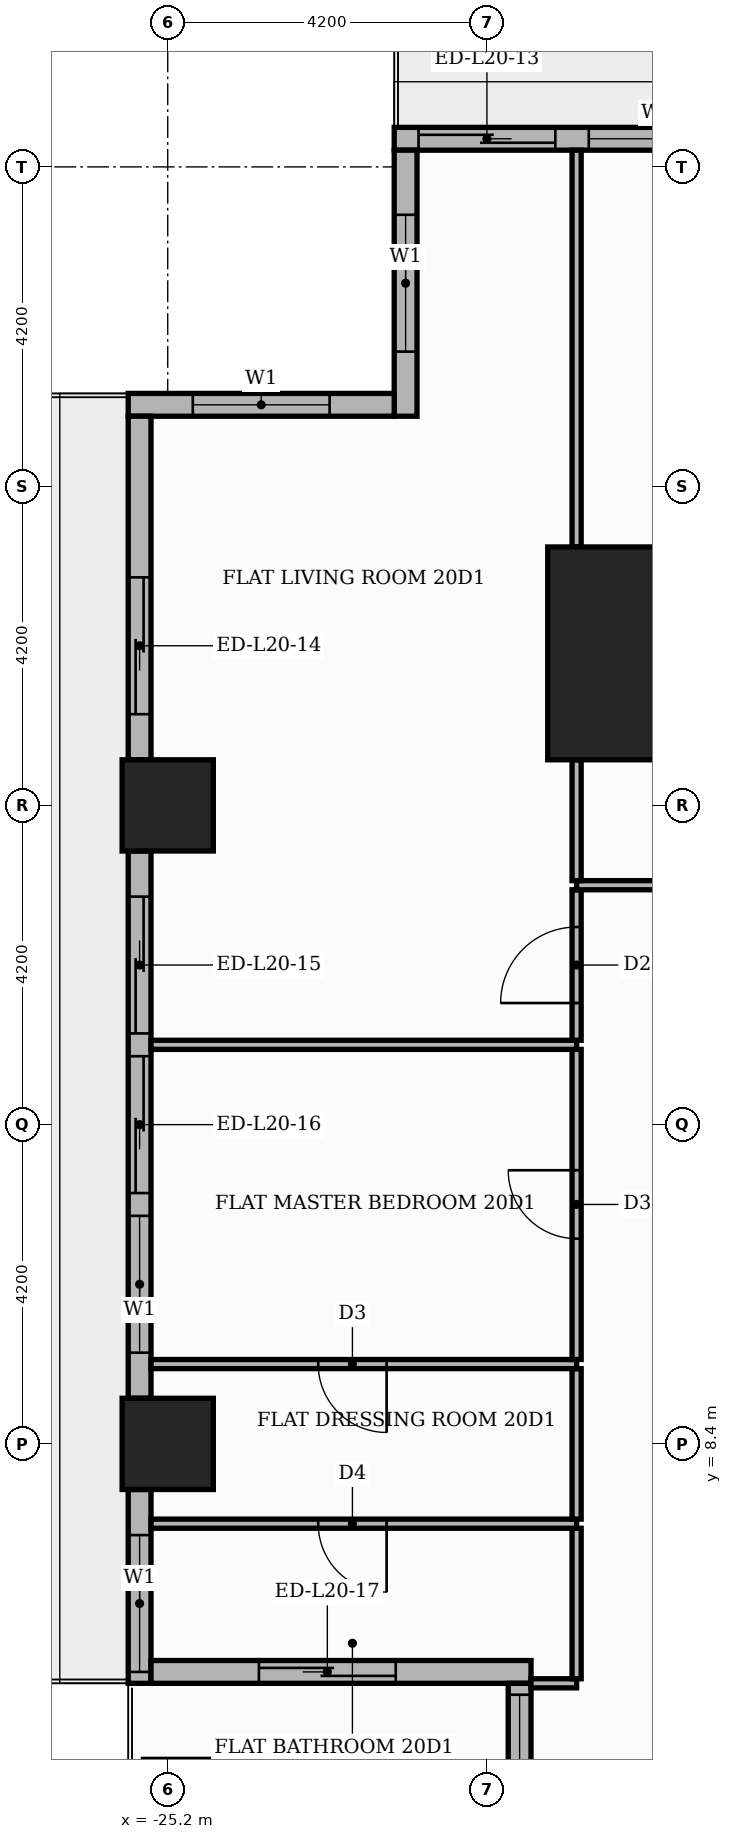
"""IFC4 building model, lengths in metres.
Left out: names, types, materials, properties, quantities, classifications, styles, units other than length and angle.
Written with IfcOpenShell. Run it as: python <this file> out.ifc"""

import sys

from ifc_helpers import new_model, si_unit, direction, frame, frame_2d, origin, origin_2d, place, context, subcontext, project, spatial, rectangle, extrude, element, fill, save


model = new_model("IFC4")
c1 = context("Model", 3, precision=1e-05, world=origin(), true_north=direction((0.0, 1.0)))
c2 = subcontext(c1, "Body", "Model", "MODEL_VIEW")
j1 = project(units=[si_unit("LENGTHUNIT", "METRE"), si_unit("PLANEANGLEUNIT", "RADIAN")], contexts=[c1])
p1 = place(None, origin())
s1 = spatial("IfcSite", under=j1, at=p1, CompositionType="ELEMENT")
p2 = place(p1, origin())
s2 = spatial("IfcBuilding", under=s1, at=p2, CompositionType="ELEMENT")
p3 = place(p2, frame((0.0, 0.0, 87.0)))
s3 = spatial("IfcBuildingStorey", under=s2, at=p3, CompositionType="ELEMENT", Elevation=87.0)
p4 = place(p3, frame((-18.8, 18.8, 0.0), z_axis=(0.0, 0.0, 1.0), x_axis=(1.0, 0.0, 0.0)))
e1 = element("IfcColumn", 1, at=p4, inside=s3, PredefinedType="COLUMN", context=c2, shape_type="SweptSolid", body=[
    extrude(rectangle(XDim=2.8, YDim=2.8, at=origin_2d()), origin(), (0.0, 0.0, 1.0), 3.9),
])
for number, where, z_axis, x_axis in (
    (2, (-25.2, 8.4, 0.0), (0.0, 0.0, 1.0), (1.0, 0.0, 0.0)),
    (3, (-25.2, 16.8, 0.0), (0.0, 0.0, 1.0), (1.0, 0.0, 0.0)),
):
    element("IfcColumn", number, at=place(p3, frame(where, z_axis=z_axis, x_axis=x_axis)), inside=s3, PredefinedType="COLUMN", context=c2, shape_type="SweptSolid", body=[
        extrude(rectangle(XDim=1.2, YDim=1.2, at=origin_2d()), origin(), (0.0, 0.0, 1.0), 3.9),
    ])
p5 = place(p3, frame((-17.4, 25.57, 0.0), z_axis=(0.0, 0.0, 1.0), x_axis=(-1.0, 0.0, 0.0)))
e4 = element("IfcWall", 4, at=p5, inside=s3, PredefinedType="STANDARD", context=c2, shape_type="SweptSolid", body=[
    extrude(rectangle(XDim=4.82, YDim=0.3, at=frame_2d((2.41, 0.0))), origin(), (0.0, 0.0, 1.0), 3.48),
])
p6 = place(p5, frame((2.7, 0.0, 0.0)))
e5 = element("IfcOpeningElement", 5, at=p6, cuts=e4, PredefinedType="OPENING", context=c2, shape_type="SweptSolid", body=[
    extrude(rectangle(XDim=1.8, YDim=2.4, at=frame_2d((0.9, 1.2))), frame((0.0, 0.16, 0.0), z_axis=(0.0, -1.0, 0.0), x_axis=(1.0, 0.0, 0.0)), (0.0, 0.0, 1.0), 0.32),
])
p7 = place(p5, frame((0.46, 0.0, 0.9)))
e6 = element("IfcOpeningElement", 6, at=p7, cuts=e4, PredefinedType="OPENING", context=c2, shape_type="SweptSolid", body=[
    extrude(rectangle(XDim=1.8, YDim=2.1, at=frame_2d((0.9, 1.05))), frame((0.0, 0.16, 0.0), z_axis=(0.0, -1.0, 0.0), x_axis=(1.0, 0.0, 0.0)), (0.0, 0.0, 1.0), 0.32),
])
p8 = place(p3, frame((-22.07, 25.42, 0.0), z_axis=(0.0, 0.0, 1.0), x_axis=(0.0, -1.0, 0.0)))
e7 = element("IfcWall", 7, at=p8, inside=s3, PredefinedType="STANDARD", context=c2, shape_type="SweptSolid", body=[
    extrude(rectangle(XDim=3.5, YDim=0.3, at=frame_2d((1.75, 0.0))), origin(), (0.0, 0.0, 1.0), 3.48),
])
p9 = place(p8, frame((0.85, 0.0, 0.9)))
e8 = element("IfcOpeningElement", 8, at=p9, cuts=e7, PredefinedType="OPENING", context=c2, shape_type="SweptSolid", body=[
    extrude(rectangle(XDim=1.8, YDim=2.1, at=frame_2d((0.9, 1.05))), frame((0.0, 0.16, 0.0), z_axis=(0.0, -1.0, 0.0), x_axis=(1.0, 0.0, 0.0)), (0.0, 0.0, 1.0), 0.32),
])
p10 = place(p3, frame((-22.22, 22.07, 0.0), z_axis=(0.0, 0.0, 1.0), x_axis=(-1.0, 0.0, 0.0)))
e9 = element("IfcWall", 9, at=p10, inside=s3, PredefinedType="STANDARD", context=c2, shape_type="SweptSolid", body=[
    extrude(rectangle(XDim=3.5, YDim=0.3, at=frame_2d((1.75, 0.0))), origin(), (0.0, 0.0, 1.0), 3.48),
])
p11 = place(p10, frame((0.85, 0.0, 0.9)))
e10 = element("IfcOpeningElement", 10, at=p11, cuts=e9, PredefinedType="OPENING", context=c2, shape_type="SweptSolid", body=[
    extrude(rectangle(XDim=1.8, YDim=2.1, at=frame_2d((0.9, 1.05))), frame((0.0, 0.16, 0.0), z_axis=(0.0, -1.0, 0.0), x_axis=(1.0, 0.0, 0.0)), (0.0, 0.0, 1.0), 0.32),
])
p12 = place(p3, frame((-25.57, 21.92, 0.0), z_axis=(0.0, 0.0, 1.0), x_axis=(0.0, -1.0, 0.0)))
e11 = element("IfcWall", 11, at=p12, inside=s3, PredefinedType="STANDARD", context=c2, shape_type="SweptSolid", body=[
    extrude(rectangle(XDim=4.52, YDim=0.3, at=frame_2d((2.26, 0.0))), origin(), (0.0, 0.0, 1.0), 3.48),
])
p13 = place(p12, frame((2.12, 0.0, 0.0)))
e12 = element("IfcOpeningElement", 12, at=p13, cuts=e11, PredefinedType="OPENING", context=c2, shape_type="SweptSolid", body=[
    extrude(rectangle(XDim=1.8, YDim=2.4, at=frame_2d((0.9, 1.2))), frame((0.0, 0.16, 0.0), z_axis=(0.0, -1.0, 0.0), x_axis=(1.0, 0.0, 0.0)), (0.0, 0.0, 1.0), 0.32),
])
p14 = place(p3, frame((-25.57, 16.2, 0.0), z_axis=(0.0, 0.0, 1.0), x_axis=(0.0, -1.0, 0.0)))
e13 = element("IfcWall", 13, at=p14, inside=s3, PredefinedType="STANDARD", context=c2, shape_type="SweptSolid", body=[
    extrude(rectangle(XDim=7.2, YDim=0.3, at=frame_2d((3.6, 0.0))), origin(), (0.0, 0.0, 1.0), 3.48),
])
p15 = place(p14, frame((0.6, 0.0, 0.0)))
e14 = element("IfcOpeningElement", 14, at=p15, cuts=e13, PredefinedType="OPENING", context=c2, shape_type="SweptSolid", body=[
    extrude(rectangle(XDim=1.8, YDim=2.4, at=frame_2d((0.9, 1.2))), frame((0.0, 0.16, 0.0), z_axis=(0.0, -1.0, 0.0), x_axis=(1.0, 0.0, 0.0)), (0.0, 0.0, 1.0), 0.32),
])
p16 = place(p14, frame((2.7, 0.0, 0.0)))
e15 = element("IfcOpeningElement", 15, at=p16, cuts=e13, PredefinedType="OPENING", context=c2, shape_type="SweptSolid", body=[
    extrude(rectangle(XDim=1.8, YDim=2.4, at=frame_2d((0.9, 1.2))), frame((0.0, 0.16, 0.0), z_axis=(0.0, -1.0, 0.0), x_axis=(1.0, 0.0, 0.0)), (0.0, 0.0, 1.0), 0.32),
])
p17 = place(p14, frame((4.8, 0.0, 0.9)))
e16 = element("IfcOpeningElement", 16, at=p17, cuts=e13, PredefinedType="OPENING", context=c2, shape_type="SweptSolid", body=[
    extrude(rectangle(XDim=1.8, YDim=2.1, at=frame_2d((0.9, 1.05))), frame((0.0, 0.16, 0.0), z_axis=(0.0, -1.0, 0.0), x_axis=(1.0, 0.0, 0.0)), (0.0, 0.0, 1.0), 0.32),
])
p18 = place(p3, frame((-25.57, 7.8, 0.0), z_axis=(0.0, 0.0, 1.0), x_axis=(0.0, -1.0, 0.0)))
e17 = element("IfcWall", 17, at=p18, inside=s3, PredefinedType="STANDARD", context=c2, shape_type="SweptSolid", body=[
    extrude(rectangle(XDim=2.55, YDim=0.3, at=frame_2d((1.275, 0.0))), origin(), (0.0, 0.0, 1.0), 3.48),
])
p19 = place(p18, frame((0.6, 0.0, 0.9)))
e18 = element("IfcOpeningElement", 18, at=p19, cuts=e17, PredefinedType="OPENING", context=c2, shape_type="SweptSolid", body=[
    extrude(rectangle(XDim=1.8, YDim=2.1, at=frame_2d((0.9, 1.05))), frame((0.0, 0.16, 0.0), z_axis=(0.0, -1.0, 0.0), x_axis=(1.0, 0.0, 0.0)), (0.0, 0.0, 1.0), 0.32),
])
p20 = place(p3, frame((-25.42, 5.4, 0.0), z_axis=(0.0, 0.0, 1.0), x_axis=(1.0, 0.0, 0.0)))
e19 = element("IfcWall", 19, at=p20, inside=s3, PredefinedType="STANDARD", context=c2, shape_type="SweptSolid", body=[
    extrude(rectangle(XDim=5.0, YDim=0.3, at=frame_2d((2.5, 0.0))), origin(), (0.0, 0.0, 1.0), 3.48),
])
p21 = place(p20, frame((1.42, 0.0, 0.0)))
e20 = element("IfcOpeningElement", 20, at=p21, cuts=e19, PredefinedType="OPENING", context=c2, shape_type="SweptSolid", body=[
    extrude(rectangle(XDim=1.8, YDim=2.4, at=frame_2d((0.9, 1.2))), frame((0.0, 0.16, 0.0), z_axis=(0.0, -1.0, 0.0), x_axis=(1.0, 0.0, 0.0)), (0.0, 0.0, 1.0), 0.32),
])
p22 = place(p3, frame((-20.57, 5.25, 0.0), z_axis=(0.0, 0.0, 1.0), x_axis=(0.0, -1.0, 0.0)))
e21 = element("IfcWall", 21, at=p22, inside=s3, PredefinedType="STANDARD", context=c2, shape_type="SweptSolid", body=[
    extrude(rectangle(XDim=10.8, YDim=0.3, at=frame_2d((5.4, 0.0))), origin(), (0.0, 0.0, 1.0), 3.48),
])
p23 = place(p22, frame((0.15, 0.0, 0.9)))
e22 = element("IfcOpeningElement", 22, at=p23, cuts=e21, PredefinedType="OPENING", context=c2, shape_type="SweptSolid", body=[
    extrude(rectangle(XDim=6.0, YDim=2.1, at=frame_2d((3.0, 1.05))), frame((0.0, 0.16, 0.0), z_axis=(0.0, -1.0, 0.0), x_axis=(1.0, 0.0, 0.0)), (0.0, 0.0, 1.0), 0.32),
])
p24 = place(p22, frame((6.45, 0.0, 0.9)))
e23 = element("IfcOpeningElement", 23, at=p24, cuts=e21, PredefinedType="OPENING", context=c2, shape_type="SweptSolid", body=[
    extrude(rectangle(XDim=3.9, YDim=2.1, at=frame_2d((1.95, 1.05))), frame((0.0, 0.16, 0.0), z_axis=(0.0, -1.0, 0.0), x_axis=(1.0, 0.0, 0.0)), (0.0, 0.0, 1.0), 0.32),
])
p25 = place(p3, frame((-20.42, 5.25, 0.0), z_axis=(0.0, 0.0, 1.0), x_axis=(1.0, 0.0, 0.0)))
e24 = element("IfcWall", 24, at=p25, inside=s3, PredefinedType="PARTITIONING", context=c2, shape_type="SweptSolid", body=[
    extrude(rectangle(XDim=0.6, YDim=0.12, at=frame_2d((0.3, 0.0))), origin(), (0.0, 0.0, 1.0), 3.48),
])
p26 = place(p3, frame((-19.82, 5.31, 0.0), z_axis=(0.0, 0.0, 1.0), x_axis=(0.0, 1.0, 0.0)))
e25 = element("IfcWall", 25, at=p26, inside=s3, PredefinedType="PARTITIONING", context=c2, shape_type="SweptSolid", body=[
    extrude(rectangle(XDim=1.98, YDim=0.12, at=frame_2d((0.99, 0.0))), origin(), (0.0, 0.0, 1.0), 3.48),
])
p27 = place(p3, frame((-25.42, 7.35, 0.0), z_axis=(0.0, 0.0, 1.0), x_axis=(1.0, 0.0, 0.0)))
e26 = element("IfcWall", 26, at=p27, inside=s3, PredefinedType="PARTITIONING", context=c2, shape_type="SweptSolid", body=[
    extrude(rectangle(XDim=5.6, YDim=0.12, at=frame_2d((2.8, 0.0))), origin(), (0.0, 0.0, 1.0), 3.48),
])
p28 = place(p27, frame((2.2, 0.0, 0.0)))
e27 = element("IfcOpeningElement", 27, at=p28, cuts=e26, PredefinedType="OPENING", context=c2, shape_type="SweptSolid", body=[
    extrude(rectangle(XDim=0.9, YDim=2.1, at=frame_2d((0.45, 1.05))), frame((0.0, 0.07, 0.0), z_axis=(0.0, -1.0, 0.0), x_axis=(1.0, 0.0, 0.0)), (0.0, 0.0, 1.0), 0.14),
])
p29 = place(p3, frame((-19.82, 7.41, 0.0), z_axis=(0.0, 0.0, 1.0), x_axis=(0.0, 1.0, 0.0)))
e28 = element("IfcWall", 28, at=p29, inside=s3, PredefinedType="PARTITIONING", context=c2, shape_type="SweptSolid", body=[
    extrude(rectangle(XDim=1.98, YDim=0.12, at=frame_2d((0.99, 0.0))), origin(), (0.0, 0.0, 1.0), 3.48),
])
p30 = place(p3, frame((-25.42, 9.45, 0.0), z_axis=(0.0, 0.0, 1.0), x_axis=(1.0, 0.0, 0.0)))
e29 = element("IfcWall", 29, at=p30, inside=s3, PredefinedType="PARTITIONING", context=c2, shape_type="SweptSolid", body=[
    extrude(rectangle(XDim=5.6, YDim=0.12, at=frame_2d((2.8, 0.0))), origin(), (0.0, 0.0, 1.0), 3.48),
])
p31 = place(p30, frame((2.2, 0.0, 0.0)))
e30 = element("IfcOpeningElement", 30, at=p31, cuts=e29, PredefinedType="OPENING", context=c2, shape_type="SweptSolid", body=[
    extrude(rectangle(XDim=0.9, YDim=2.1, at=frame_2d((0.45, 1.05))), frame((0.0, 0.07, 0.0), z_axis=(0.0, -1.0, 0.0), x_axis=(1.0, 0.0, 0.0)), (0.0, 0.0, 1.0), 0.14),
])
p32 = place(p3, frame((-19.82, 9.51, 0.0), z_axis=(0.0, 0.0, 1.0), x_axis=(0.0, 1.0, 0.0)))
e31 = element("IfcWall", 31, at=p32, inside=s3, PredefinedType="PARTITIONING", context=c2, shape_type="SweptSolid", body=[
    extrude(rectangle(XDim=4.08, YDim=0.12, at=frame_2d((2.04, 0.0))), origin(), (0.0, 0.0, 1.0), 3.48),
])
p33 = place(p32, frame((1.59, 0.0, 0.0)))
e32 = element("IfcOpeningElement", 32, at=p33, cuts=e31, PredefinedType="OPENING", context=c2, shape_type="SweptSolid", body=[
    extrude(rectangle(XDim=0.9, YDim=2.1, at=frame_2d((0.45, 1.05))), frame((0.0, 0.07, 0.0), z_axis=(0.0, -1.0, 0.0), x_axis=(1.0, 0.0, 0.0)), (0.0, 0.0, 1.0), 0.14),
])
p34 = place(p3, frame((-25.42, 13.65, 0.0), z_axis=(0.0, 0.0, 1.0), x_axis=(1.0, 0.0, 0.0)))
e33 = element("IfcWall", 33, at=p34, inside=s3, PredefinedType="PARTITIONING", context=c2, shape_type="SweptSolid", body=[
    extrude(rectangle(XDim=5.6, YDim=0.12, at=frame_2d((2.8, 0.0))), origin(), (0.0, 0.0, 1.0), 3.48),
])
p35 = place(p3, frame((-19.82, 13.71, 0.0), z_axis=(0.0, 0.0, 1.0), x_axis=(0.0, 1.0, 0.0)))
e34 = element("IfcWall", 34, at=p35, inside=s3, PredefinedType="PARTITIONING", context=c2, shape_type="SweptSolid", body=[
    extrude(rectangle(XDim=1.98, YDim=0.12, at=frame_2d((0.99, 0.0))), origin(), (0.0, 0.0, 1.0), 3.48),
])
p36 = place(p35, frame((0.49, 0.0, 0.0)))
e35 = element("IfcOpeningElement", 35, at=p36, cuts=e34, PredefinedType="OPENING", context=c2, shape_type="SweptSolid", body=[
    extrude(rectangle(XDim=1.0, YDim=2.1, at=frame_2d((0.5, 1.05))), frame((0.0, 0.07, 0.0), z_axis=(0.0, -1.0, 0.0), x_axis=(1.0, 0.0, 0.0)), (0.0, 0.0, 1.0), 0.14),
])
p37 = place(p3, frame((-19.82, 15.75, 0.0), z_axis=(0.0, 0.0, 1.0), x_axis=(1.0, 0.0, 0.0)))
e36 = element("IfcWall", 36, at=p37, inside=s3, PredefinedType="PARTITIONING", context=c2, shape_type="SweptSolid", body=[
    extrude(rectangle(XDim=6.07, YDim=0.12, at=frame_2d((3.035, 0.0))), origin(), (0.0, 0.0, 1.0), 3.48),
])
p38 = place(p37, frame((2.635, 0.0, 0.0)))
e37 = element("IfcOpeningElement", 37, at=p38, cuts=e36, PredefinedType="OPENING", context=c2, shape_type="SweptSolid", body=[
    extrude(rectangle(XDim=0.9, YDim=2.1, at=frame_2d((0.45, 1.05))), frame((0.0, 0.07, 0.0), z_axis=(0.0, -1.0, 0.0), x_axis=(1.0, 0.0, 0.0)), (0.0, 0.0, 1.0), 0.14),
])
p39 = place(p3, frame((-19.82, 15.81, 0.0), z_axis=(0.0, 0.0, 1.0), x_axis=(0.0, 1.0, 0.0)))
e38 = element("IfcWall", 38, at=p39, inside=s3, PredefinedType="PARTITIONING", context=c2, shape_type="SweptSolid", body=[
    extrude(rectangle(XDim=1.59, YDim=0.12, at=frame_2d((0.795, 0.0))), origin(), (0.0, 0.0, 1.0), 3.48),
])
p40 = place(p3, frame((-19.82, 20.2, 0.0), z_axis=(0.0, 0.0, 1.0), x_axis=(0.0, 1.0, 0.0)))
e39 = element("IfcWall", 39, at=p40, inside=s3, PredefinedType="PARTITIONING", context=c2, shape_type="SweptSolid", body=[
    extrude(rectangle(XDim=5.22, YDim=0.12, at=frame_2d((2.61, 0.0))), origin(), (0.0, 0.0, 1.0), 3.48),
])
p41 = place(p6, origin())
e40 = element("IfcDoor", 40, at=p41, inside=s3, OperationType="SLIDING_TO_LEFT", PredefinedType="DOOR", context=c2, shape_type="SweptSolid", body=[
    extrude(rectangle(XDim=1.8, YDim=2.4, at=frame_2d((0.9, 1.2))), frame((0.0, 0.025, 0.0), z_axis=(0.0, -1.0, 0.0), x_axis=(1.0, 0.0, 0.0)), (0.0, 0.0, 1.0), 0.05),
])
fill(e5, e40)
p42 = place(p7, origin())
e41 = element("IfcWindow", 41, at=p42, inside=s3, PartitioningType="SINGLE_PANEL", PredefinedType="WINDOW", context=c2, shape_type="SweptSolid", body=[
    extrude(rectangle(XDim=1.8, YDim=2.1, at=frame_2d((0.9, 1.05))), frame((0.0, 0.03, 0.0), z_axis=(0.0, -1.0, 0.0), x_axis=(1.0, 0.0, 0.0)), (0.0, 0.0, 1.0), 0.06),
])
fill(e6, e41)
p43 = place(p9, origin())
e42 = element("IfcWindow", 42, at=p43, inside=s3, PartitioningType="SINGLE_PANEL", PredefinedType="WINDOW", context=c2, shape_type="SweptSolid", body=[
    extrude(rectangle(XDim=1.8, YDim=2.1, at=frame_2d((0.9, 1.05))), frame((0.0, 0.03, 0.0), z_axis=(0.0, -1.0, 0.0), x_axis=(1.0, 0.0, 0.0)), (0.0, 0.0, 1.0), 0.06),
])
fill(e8, e42)
p44 = place(p11, origin())
e43 = element("IfcWindow", 43, at=p44, inside=s3, PartitioningType="SINGLE_PANEL", PredefinedType="WINDOW", context=c2, shape_type="SweptSolid", body=[
    extrude(rectangle(XDim=1.8, YDim=2.1, at=frame_2d((0.9, 1.05))), frame((0.0, 0.03, 0.0), z_axis=(0.0, -1.0, 0.0), x_axis=(1.0, 0.0, 0.0)), (0.0, 0.0, 1.0), 0.06),
])
fill(e10, e43)
p45 = place(p13, origin())
e44 = element("IfcDoor", 44, at=p45, inside=s3, OperationType="SLIDING_TO_RIGHT", PredefinedType="DOOR", context=c2, shape_type="SweptSolid", body=[
    extrude(rectangle(XDim=1.8, YDim=2.4, at=frame_2d((0.9, 1.2))), frame((0.0, 0.025, 0.0), z_axis=(0.0, -1.0, 0.0), x_axis=(1.0, 0.0, 0.0)), (0.0, 0.0, 1.0), 0.05),
])
fill(e12, e44)
p46 = place(p15, origin())
e45 = element("IfcDoor", 45, at=p46, inside=s3, OperationType="SLIDING_TO_LEFT", PredefinedType="DOOR", context=c2, shape_type="SweptSolid", body=[
    extrude(rectangle(XDim=1.8, YDim=2.4, at=frame_2d((0.9, 1.2))), frame((0.0, 0.025, 0.0), z_axis=(0.0, -1.0, 0.0), x_axis=(1.0, 0.0, 0.0)), (0.0, 0.0, 1.0), 0.05),
])
fill(e14, e45)
p47 = place(p16, origin())
e46 = element("IfcDoor", 46, at=p47, inside=s3, OperationType="SLIDING_TO_RIGHT", PredefinedType="DOOR", context=c2, shape_type="SweptSolid", body=[
    extrude(rectangle(XDim=1.8, YDim=2.4, at=frame_2d((0.9, 1.2))), frame((0.0, 0.025, 0.0), z_axis=(0.0, -1.0, 0.0), x_axis=(1.0, 0.0, 0.0)), (0.0, 0.0, 1.0), 0.05),
])
fill(e15, e46)
p48 = place(p17, origin())
e47 = element("IfcWindow", 47, at=p48, inside=s3, PartitioningType="SINGLE_PANEL", PredefinedType="WINDOW", context=c2, shape_type="SweptSolid", body=[
    extrude(rectangle(XDim=1.8, YDim=2.1, at=frame_2d((0.9, 1.05))), frame((0.0, 0.03, 0.0), z_axis=(0.0, -1.0, 0.0), x_axis=(1.0, 0.0, 0.0)), (0.0, 0.0, 1.0), 0.06),
])
fill(e16, e47)
p49 = place(p19, origin())
e48 = element("IfcWindow", 48, at=p49, inside=s3, PartitioningType="SINGLE_PANEL", PredefinedType="WINDOW", context=c2, shape_type="SweptSolid", body=[
    extrude(rectangle(XDim=1.8, YDim=2.1, at=frame_2d((0.9, 1.05))), frame((0.0, 0.03, 0.0), z_axis=(0.0, -1.0, 0.0), x_axis=(1.0, 0.0, 0.0)), (0.0, 0.0, 1.0), 0.06),
])
fill(e18, e48)
p50 = place(p21, origin())
e49 = element("IfcDoor", 49, at=p50, inside=s3, OperationType="SLIDING_TO_LEFT", PredefinedType="DOOR", context=c2, shape_type="SweptSolid", body=[
    extrude(rectangle(XDim=1.8, YDim=2.4, at=frame_2d((0.9, 1.2))), frame((0.0, 0.025, 0.0), z_axis=(0.0, -1.0, 0.0), x_axis=(1.0, 0.0, 0.0)), (0.0, 0.0, 1.0), 0.05),
])
fill(e20, e49)
p51 = place(p23, origin())
e50 = element("IfcWindow", 50, at=p51, inside=s3, PartitioningType="SINGLE_PANEL", PredefinedType="WINDOW", context=c2, shape_type="SweptSolid", body=[
    extrude(rectangle(XDim=6.0, YDim=2.1, at=frame_2d((3.0, 1.05))), frame((0.0, 0.03, 0.0), z_axis=(0.0, -1.0, 0.0), x_axis=(1.0, 0.0, 0.0)), (0.0, 0.0, 1.0), 0.06),
])
fill(e22, e50)
p52 = place(p36, origin())
e51 = element("IfcDoor", 51, at=p52, inside=s3, OperationType="SINGLE_SWING_LEFT", PredefinedType="DOOR", context=c2, shape_type="SweptSolid", body=[
    extrude(rectangle(XDim=1.0, YDim=2.1, at=frame_2d((0.5, 1.05))), frame((0.0, 0.025, 0.0), z_axis=(0.0, -1.0, 0.0), x_axis=(1.0, 0.0, 0.0)), (0.0, 0.0, 1.0), 0.05),
])
fill(e35, e51)
p53 = place(p33, origin())
e52 = element("IfcDoor", 52, at=p53, inside=s3, OperationType="SINGLE_SWING_RIGHT", PredefinedType="DOOR", context=c2, shape_type="SweptSolid", body=[
    extrude(rectangle(XDim=0.9, YDim=2.1, at=frame_2d((0.45, 1.05))), frame((0.0, 0.025, 0.0), z_axis=(0.0, -1.0, 0.0), x_axis=(1.0, 0.0, 0.0)), (0.0, 0.0, 1.0), 0.05),
])
fill(e32, e52)
p54 = place(p31, frame((0.9, 0.0, 0.0), z_axis=(0.0, 0.0, 1.0), x_axis=(-1.0, 0.0, 0.0)))
e53 = element("IfcDoor", 53, at=p54, inside=s3, OperationType="SINGLE_SWING_RIGHT", PredefinedType="DOOR", context=c2, shape_type="SweptSolid", body=[
    extrude(rectangle(XDim=0.9, YDim=2.1, at=frame_2d((0.45, 1.05))), frame((0.0, 0.025, 0.0), z_axis=(0.0, -1.0, 0.0), x_axis=(1.0, 0.0, 0.0)), (0.0, 0.0, 1.0), 0.05),
])
fill(e30, e53)
p55 = place(p28, frame((0.9, 0.0, 0.0), z_axis=(0.0, 0.0, 1.0), x_axis=(-1.0, 0.0, 0.0)))
e54 = element("IfcDoor", 54, at=p55, inside=s3, OperationType="SINGLE_SWING_RIGHT", PredefinedType="DOOR", context=c2, shape_type="SweptSolid", body=[
    extrude(rectangle(XDim=0.9, YDim=2.1, at=frame_2d((0.45, 1.05))), frame((0.0, 0.025, 0.0), z_axis=(0.0, -1.0, 0.0), x_axis=(1.0, 0.0, 0.0)), (0.0, 0.0, 1.0), 0.05),
])
fill(e27, e54)
save(model, sys.argv[1])
